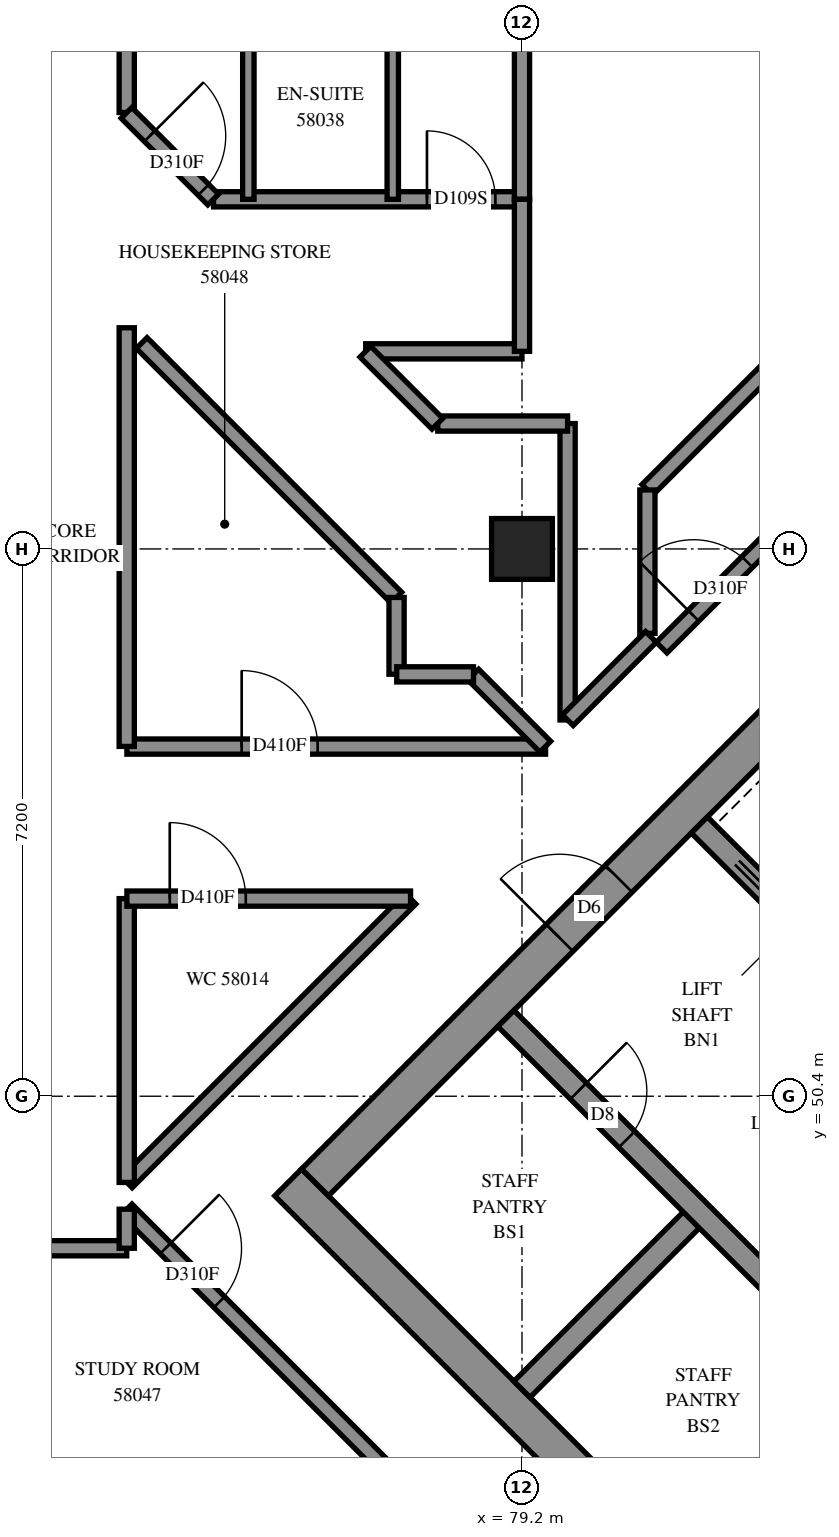
"""IFC4 building model, lengths in metres.
Left out: names, types, materials, properties, quantities, classifications, styles, units other than length and angle.
Written with IfcOpenShell. Run it as: python <this file> out.ifc"""

import sys

from ifc_helpers import new_model, si_unit, direction, frame, frame_2d, origin, origin_2d, place, context, subcontext, project, spatial, rectangle, extrude, element, fill, save


model = new_model("IFC4")
c1 = context("Model", 3, precision=1e-05, world=origin(), true_north=direction((0.0, 1.0)))
c2 = subcontext(c1, "Body", "Model", "MODEL_VIEW")
j1 = project(units=[si_unit("LENGTHUNIT", "METRE"), si_unit("PLANEANGLEUNIT", "RADIAN")], contexts=[c1])
p1 = place(None, origin())
s1 = spatial("IfcSite", under=j1, at=p1, CompositionType="ELEMENT")
p2 = place(p1, origin())
s2 = spatial("IfcBuilding", under=s1, at=p2, CompositionType="ELEMENT")
p3 = place(p2, frame((0.0, 0.0, 213.4)))
s3 = spatial("IfcBuildingStorey", under=s2, at=p3, CompositionType="ELEMENT", Elevation=213.4)
p4 = place(p3, frame((79.2, 57.6, 0.0), z_axis=(0.0, 0.0, 1.0), x_axis=(1.0, 0.0, 0.0)))
e1 = element("IfcColumn", 1, at=p4, inside=s3, PredefinedType="COLUMN", context=c2, shape_type="SweptSolid", body=[
    extrude(rectangle(XDim=0.8, YDim=0.8, at=origin_2d()), origin(), (0.0, 0.0, 1.0), 3.1),
])
p5 = place(p3, frame((76.124, 49.267, -0.3), z_axis=(0.0, 0.0, 1.0), x_axis=(0.7071067812, -0.7071067812, 0.0)))
e2 = element("IfcWall", 2, at=p5, inside=s3, PredefinedType="SHEAR", context=c2, shape_type="SweptSolid", body=[
    extrude(rectangle(XDim=15.4, YDim=0.5, at=frame_2d((7.7, 0.0))), origin(), (0.0, 0.0, 1.0), 2.7),
])
p6 = place(p3, frame((76.478, 49.267, -0.3), z_axis=(0.0, 0.0, 1.0), x_axis=(0.7071067812, 0.7071067812, 0.0)))
e3 = element("IfcWall", 3, at=p6, inside=s3, PredefinedType="SHEAR", context=c2, shape_type="SweptSolid", body=[
    extrude(rectangle(XDim=14.4, YDim=0.5, at=frame_2d((7.2, 0.0))), origin(), (0.0, 0.0, 1.0), 2.7),
])
p7 = place(p6, frame((4.55, 0.0, 0.3)))
e4 = element("IfcOpeningElement", 4, at=p7, cuts=e3, PredefinedType="OPENING", context=c2, shape_type="SweptSolid", body=[
    extrude(rectangle(XDim=1.1, YDim=2.1, at=frame_2d((0.55, 1.05))), frame((0.0, 0.26, 0.0), z_axis=(0.0, -1.0, 0.0), x_axis=(1.0, 0.0, 0.0)), (0.0, 0.0, 1.0), 0.52),
])
p8 = place(p6, frame((11.35, 0.0, 0.3)))
e5 = element("IfcOpeningElement", 5, at=p8, cuts=e3, PredefinedType="OPENING", context=c2, shape_type="SweptSolid", body=[
    extrude(rectangle(XDim=1.1, YDim=2.1, at=frame_2d((0.55, 1.05))), frame((0.0, 0.26, 0.0), z_axis=(0.0, -1.0, 0.0), x_axis=(1.0, 0.0, 0.0)), (0.0, 0.0, 1.0), 0.52),
])
p9 = place(p3, frame((79.2, 46.544, 0.0), z_axis=(0.0, 0.0, 1.0), x_axis=(0.7071219326, 0.7070916295, 0.0)))
e6 = element("IfcWall", 6, at=p9, inside=s3, PredefinedType="SOLIDWALL", context=c2, shape_type="SweptSolid", body=[
    extrude(rectangle(XDim=3.3, YDim=0.3, at=frame_2d((1.65, 0.0))), origin(), (0.0, 0.0, 1.0), 3.1),
])
p10 = place(p3, frame((81.746, 43.999, 0.0), z_axis=(0.0, 0.0, 1.0), x_axis=(0.7071067812, 0.7071067812, 0.0)))
e7 = element("IfcWall", 7, at=p10, inside=s3, PredefinedType="SOLIDWALL", context=c2, shape_type="SweptSolid", body=[
    extrude(rectangle(XDim=3.3, YDim=0.3, at=frame_2d((1.65, 0.0))), origin(), (0.0, 0.0, 1.0), 3.1),
])
p11 = place(p3, frame((78.988, 51.423, 0.0), z_axis=(0.0, 0.0, 1.0), x_axis=(0.7071067812, -0.7071067812, 0.0)))
e8 = element("IfcWall", 8, at=p11, inside=s3, PredefinedType="SOLIDWALL", context=c2, shape_type="SweptSolid", body=[
    extrude(rectangle(XDim=14.4, YDim=0.3, at=frame_2d((7.2, 0.0))), origin(), (0.0, 0.0, 1.0), 3.1),
])
p12 = place(p11, frame((1.35, 0.0, 0.0)))
e9 = element("IfcOpeningElement", 9, at=p12, cuts=e8, PredefinedType="OPENING", context=c2, shape_type="SweptSolid", body=[
    extrude(rectangle(XDim=0.9, YDim=2.1, at=frame_2d((0.45, 1.05))), frame((0.0, 0.16, 0.0), z_axis=(0.0, -1.0, 0.0), x_axis=(1.0, 0.0, 0.0)), (0.0, 0.0, 1.0), 0.32),
])
p13 = place(p11, frame((4.95, 0.0, 0.0)))
e10 = element("IfcOpeningElement", 10, at=p13, cuts=e8, PredefinedType="OPENING", context=c2, shape_type="SweptSolid", body=[
    extrude(rectangle(XDim=0.9, YDim=2.1, at=frame_2d((0.45, 1.05))), frame((0.0, 0.16, 0.0), z_axis=(0.0, -1.0, 0.0), x_axis=(1.0, 0.0, 0.0)), (0.0, 0.0, 1.0), 0.32),
])
p14 = place(p11, frame((8.55, 0.0, 0.0)))
e11 = element("IfcOpeningElement", 11, at=p14, cuts=e8, PredefinedType="OPENING", context=c2, shape_type="SweptSolid", body=[
    extrude(rectangle(XDim=0.9, YDim=2.1, at=frame_2d((0.45, 1.05))), frame((0.0, 0.16, 0.0), z_axis=(0.0, -1.0, 0.0), x_axis=(1.0, 0.0, 0.0)), (0.0, 0.0, 1.0), 0.32),
])
p15 = place(p11, frame((12.05, 0.0, 0.0)))
e12 = element("IfcOpeningElement", 12, at=p15, cuts=e8, PredefinedType="OPENING", context=c2, shape_type="SweptSolid", body=[
    extrude(rectangle(XDim=1.1, YDim=2.1, at=frame_2d((0.55, 1.05))), frame((0.0, 0.16, 0.0), z_axis=(0.0, -1.0, 0.0), x_axis=(1.0, 0.0, 0.0)), (0.0, 0.0, 1.0), 0.32),
])
p16 = place(p3, frame((81.534, 53.969, 0.0), z_axis=(0.0, 0.0, 1.0), x_axis=(0.707103309, -0.7071102534, 0.0)))
e13 = element("IfcWall", 13, at=p16, inside=s3, PredefinedType="SOLIDWALL", context=c2, shape_type="SweptSolid", body=[
    extrude(rectangle(XDim=14.4, YDim=0.3, at=frame_2d((7.2, 0.0))), origin(), (0.0, 0.0, 1.0), 3.1),
])
p17 = place(p16, frame((1.25, 0.0, 0.0)))
e14 = element("IfcOpeningElement", 14, at=p17, cuts=e13, PredefinedType="OPENING", context=c2, shape_type="SweptSolid", body=[
    extrude(rectangle(XDim=1.1, YDim=2.1, at=frame_2d((0.55, 1.05))), frame((0.0, 0.16, 0.0), z_axis=(0.0, -1.0, 0.0), x_axis=(1.0, 0.0, 0.0)), (0.0, 0.0, 1.0), 0.32),
])
p18 = place(p16, frame((4.85, 0.0, 0.0)))
e15 = element("IfcOpeningElement", 15, at=p18, cuts=e13, PredefinedType="OPENING", context=c2, shape_type="SweptSolid", body=[
    extrude(rectangle(XDim=1.1, YDim=2.1, at=frame_2d((0.55, 1.05))), frame((0.0, 0.16, 0.0), z_axis=(0.0, -1.0, 0.0), x_axis=(1.0, 0.0, 0.0)), (0.0, 0.0, 1.0), 0.32),
])
p19 = place(p16, frame((8.45, 0.0, 0.0)))
e16 = element("IfcOpeningElement", 16, at=p19, cuts=e13, PredefinedType="OPENING", context=c2, shape_type="SweptSolid", body=[
    extrude(rectangle(XDim=1.1, YDim=2.1, at=frame_2d((0.55, 1.05))), frame((0.0, 0.16, 0.0), z_axis=(0.0, -1.0, 0.0), x_axis=(1.0, 0.0, 0.0)), (0.0, 0.0, 1.0), 0.32),
])
p20 = place(p16, frame((12.05, 0.0, 0.0)))
e17 = element("IfcOpeningElement", 17, at=p20, cuts=e13, PredefinedType="OPENING", context=c2, shape_type="SweptSolid", body=[
    extrude(rectangle(XDim=1.1, YDim=2.1, at=frame_2d((0.55, 1.05))), frame((0.0, 0.16, 0.0), z_axis=(0.0, -1.0, 0.0), x_axis=(1.0, 0.0, 0.0)), (0.0, 0.0, 1.0), 0.32),
])
p21 = place(p3, frame((55.6, 48.4, 0.0), z_axis=(0.0, 0.0, 1.0), x_axis=(1.0, 0.0, 0.0)))
e18 = element("IfcWall", 18, at=p21, inside=s3, PredefinedType="PARTITIONING", context=c2, shape_type="SweptSolid", body=[
    extrude(rectangle(XDim=18.4, YDim=0.2, at=frame_2d((9.2, 0.0))), origin(), (0.0, 0.0, 1.0), 3.1),
])
p22 = place(p21, frame((5.862, 0.0, 0.0)))
e19 = element("IfcOpeningElement", 19, at=p22, cuts=e18, PredefinedType="OPENING", context=c2, shape_type="SweptSolid", body=[
    extrude(rectangle(XDim=1.0, YDim=2.1, at=frame_2d((0.5, 1.05))), frame((0.0, 0.11, 0.0), z_axis=(0.0, -1.0, 0.0), x_axis=(1.0, 0.0, 0.0)), (0.0, 0.0, 1.0), 0.22),
])
p23 = place(p21, frame((13.099, 0.0, 0.0)))
e20 = element("IfcOpeningElement", 20, at=p23, cuts=e18, PredefinedType="OPENING", context=c2, shape_type="SweptSolid", body=[
    extrude(rectangle(XDim=0.9, YDim=2.1, at=frame_2d((0.45, 1.05))), frame((0.0, 0.11, 0.0), z_axis=(0.0, -1.0, 0.0), x_axis=(1.0, 0.0, 0.0)), (0.0, 0.0, 1.0), 0.22),
])
p24 = place(p3, frame((80.849, 58.377, 0.0), z_axis=(0.0, 0.0, 1.0), x_axis=(0.7071067812, 0.7071067812, 0.0)))
e21 = element("IfcWall", 21, at=p24, inside=s3, PredefinedType="PARTITIONING", context=c2, shape_type="SweptSolid", body=[
    extrude(rectangle(XDim=9.43, YDim=0.2, at=frame_2d((4.715, 0.0))), origin(), (0.0, 0.0, 1.0), 3.1),
])
p25 = place(p3, frame((81.037, 56.303, 0.0), z_axis=(0.0, 0.0, 1.0), x_axis=(0.7071067812, 0.7071067812, 0.0)))
e22 = element("IfcWall", 22, at=p25, inside=s3, PredefinedType="PARTITIONING", context=c2, shape_type="SweptSolid", body=[
    extrude(rectangle(XDim=8.2, YDim=0.2, at=frame_2d((4.1, 0.0))), origin(), (0.0, 0.0, 1.0), 3.1),
])
p26 = place(p25, frame((0.592, 0.0, 0.0)))
e23 = element("IfcOpeningElement", 23, at=p26, cuts=e22, PredefinedType="OPENING", context=c2, shape_type="SweptSolid", body=[
    extrude(rectangle(XDim=1.0, YDim=2.1, at=frame_2d((0.5, 1.05))), frame((0.0, 0.11, 0.0), z_axis=(0.0, -1.0, 0.0), x_axis=(1.0, 0.0, 0.0)), (0.0, 0.0, 1.0), 0.22),
])
p27 = place(p3, frame((73.999, 48.911, 0.0), z_axis=(0.0, 0.0, 1.0), x_axis=(0.7071067812, -0.7071067812, 0.0)))
e24 = element("IfcWall", 24, at=p27, inside=s3, PredefinedType="PARTITIONING", context=c2, shape_type="SweptSolid", body=[
    extrude(rectangle(XDim=5.745, YDim=0.2, at=frame_2d((2.872, 0.0))), origin(), (0.0, 0.0, 1.0), 3.1),
])
p28 = place(p27, frame((0.724, 0.0, 0.0)))
e25 = element("IfcOpeningElement", 25, at=p28, cuts=e24, PredefinedType="OPENING", context=c2, shape_type="SweptSolid", body=[
    extrude(rectangle(XDim=1.0, YDim=2.1, at=frame_2d((0.5, 1.05))), frame((0.0, 0.11, 0.0), z_axis=(0.0, -1.0, 0.0), x_axis=(1.0, 0.0, 0.0)), (0.0, 0.0, 1.0), 0.22),
])
p29 = place(p3, frame((74.002, 55.0, 0.0), z_axis=(0.0, 0.0, 1.0), x_axis=(1.0, 0.0, 0.0)))
e26 = element("IfcWall", 26, at=p29, inside=s3, PredefinedType="PARTITIONING", context=c2, shape_type="SweptSolid", body=[
    extrude(rectangle(XDim=5.508, YDim=0.2, at=frame_2d((2.754, 0.0))), origin(), (0.0, 0.0, 1.0), 3.1),
])
p30 = place(p29, frame((1.51, 0.0, 0.0)))
e27 = element("IfcOpeningElement", 27, at=p30, cuts=e26, PredefinedType="OPENING", context=c2, shape_type="SweptSolid", body=[
    extrude(rectangle(XDim=1.0, YDim=2.1, at=frame_2d((0.5, 1.05))), frame((0.0, 0.11, 0.0), z_axis=(0.0, -1.0, 0.0), x_axis=(1.0, 0.0, 0.0)), (0.0, 0.0, 1.0), 0.22),
])
p31 = place(p3, frame((74.0, 55.002, 0.0), z_axis=(0.0, 0.0, 1.0), x_axis=(0.0, 1.0, 0.0)))
e28 = element("IfcWall", 28, at=p31, inside=s3, PredefinedType="PARTITIONING", context=c2, shape_type="SweptSolid", body=[
    extrude(rectangle(XDim=5.508, YDim=0.2, at=frame_2d((2.754, 0.0))), origin(), (0.0, 0.0, 1.0), 3.1),
])
p32 = place(p3, frame((74.001, 49.267, 0.0), z_axis=(0.0, 0.0, 1.0), x_axis=(0.7071067812, 0.7071067812, 0.0)))
e29 = element("IfcWall", 29, at=p32, inside=s3, PredefinedType="PARTITIONING", context=c2, shape_type="SweptSolid", body=[
    extrude(rectangle(XDim=5.278, YDim=0.2, at=frame_2d((2.639, 0.0))), origin(), (0.0, 0.0, 1.0), 3.1),
])
p33 = place(p3, frame((74.197, 60.309, 0.0), z_axis=(0.0, 0.0, 1.0), x_axis=(0.7071067812, -0.7071067812, 0.0)))
e30 = element("IfcWall", 30, at=p33, inside=s3, PredefinedType="PARTITIONING", context=c2, shape_type="SweptSolid", body=[
    extrude(rectangle(XDim=4.738, YDim=0.2, at=frame_2d((2.369, 0.0))), origin(), (0.0, 0.0, 1.0), 3.1),
])
p34 = place(p3, frame((75.142, 62.2, 0.0), z_axis=(0.0, 0.0, 1.0), x_axis=(1.0, 0.0, 0.0)))
e31 = element("IfcWall", 31, at=p34, inside=s3, PredefinedType="PARTITIONING", context=c2, shape_type="SweptSolid", body=[
    extrude(rectangle(XDim=4.058, YDim=0.2, at=frame_2d((2.029, 0.0))), origin(), (0.0, 0.0, 1.0), 3.1),
])
p35 = place(p34, frame((2.808, 0.0, 0.0)))
e32 = element("IfcOpeningElement", 32, at=p35, cuts=e31, PredefinedType="OPENING", context=c2, shape_type="SweptSolid", body=[
    extrude(rectangle(XDim=0.9, YDim=2.1, at=frame_2d((0.45, 1.05))), frame((0.0, 0.11, 0.0), z_axis=(0.0, -1.0, 0.0), x_axis=(1.0, 0.0, 0.0)), (0.0, 0.0, 1.0), 0.22),
])
p36 = place(p3, frame((79.8, 55.35, 0.0), z_axis=(0.0, 0.0, 1.0), x_axis=(0.0, 1.0, 0.0)))
e33 = element("IfcWall", 33, at=p36, inside=s3, PredefinedType="PARTITIONING", context=c2, shape_type="SweptSolid", body=[
    extrude(rectangle(XDim=3.9, YDim=0.2, at=frame_2d((1.95, 0.0))), origin(), (0.0, 0.0, 1.0), 3.1),
])
p37 = place(p3, frame((74.0, 49.266, 0.0), z_axis=(0.0, 0.0, 1.0), x_axis=(0.0, 1.0, 0.0)))
e34 = element("IfcWall", 34, at=p37, inside=s3, PredefinedType="PARTITIONING", context=c2, shape_type="SweptSolid", body=[
    extrude(rectangle(XDim=3.734, YDim=0.2, at=frame_2d((1.867, 0.0))), origin(), (0.0, 0.0, 1.0), 3.1),
])
p38 = place(p3, frame((74.002, 53.0, 0.0), z_axis=(0.0, 0.0, 1.0), x_axis=(1.0, 0.0, 0.0)))
e35 = element("IfcWall", 35, at=p38, inside=s3, PredefinedType="PARTITIONING", context=c2, shape_type="SweptSolid", body=[
    extrude(rectangle(XDim=3.732, YDim=0.2, at=frame_2d((1.866, 0.0))), origin(), (0.0, 0.0, 1.0), 3.1),
])
p39 = place(p38, frame((0.564, 0.0, 0.0)))
e36 = element("IfcOpeningElement", 36, at=p39, cuts=e35, PredefinedType="OPENING", context=c2, shape_type="SweptSolid", body=[
    extrude(rectangle(XDim=1.0, YDim=2.1, at=frame_2d((0.5, 1.05))), frame((0.0, 0.11, 0.0), z_axis=(0.0, -1.0, 0.0), x_axis=(1.0, 0.0, 0.0)), (0.0, 0.0, 1.0), 0.22),
])
p40 = place(p3, frame((74.0, 63.342, 0.0), z_axis=(0.0, 0.0, 1.0), x_axis=(0.0, 1.0, 0.0)))
e37 = element("IfcWall", 37, at=p40, inside=s3, PredefinedType="PARTITIONING", context=c2, shape_type="SweptSolid", body=[
    extrude(rectangle(XDim=3.458, YDim=0.2, at=frame_2d((1.729, 0.0))), origin(), (0.0, 0.0, 1.0), 3.1),
])
for number, where, z_axis, x_axis in (
    (38, (75.6, 62.2, 0.0), (0.0, 0.0, 1.0), (0.0, 1.0, 0.0)),
    (39, (77.5, 62.2, 0.0), (0.0, 0.0, 1.0), (0.0, 1.0, 0.0)),
):
    element("IfcWall", number, at=place(p3, frame(where, z_axis=z_axis, x_axis=x_axis)), inside=s3, PredefinedType="PARTITIONING", context=c2, shape_type="SweptSolid", body=[
        extrude(rectangle(XDim=2.4, YDim=0.15, at=frame_2d((1.2, 0.0))), origin(), (0.0, 0.0, 1.0), 3.1),
    ])
p41 = place(p3, frame((79.2, 62.2, 0.0), z_axis=(0.0, 0.0, 1.0), x_axis=(0.0, 1.0, 0.0)))
e40 = element("IfcWall", 40, at=p41, inside=s3, PredefinedType="PARTITIONING", context=c2, shape_type="SweptSolid", body=[
    extrude(rectangle(XDim=2.2, YDim=0.2, at=frame_2d((1.1, 0.0))), origin(), (0.0, 0.0, 1.0), 3.1),
])
p42 = place(p3, frame((77.144, 60.2, 0.0), z_axis=(0.0, 0.0, 1.0), x_axis=(1.0, 0.0, 0.0)))
e41 = element("IfcWall", 41, at=p42, inside=s3, PredefinedType="PARTITIONING", context=c2, shape_type="SweptSolid", body=[
    extrude(rectangle(XDim=2.056, YDim=0.2, at=frame_2d((1.028, 0.0))), origin(), (0.0, 0.0, 1.0), 3.1),
])
p43 = place(p3, frame((79.2, 60.2, 0.0), z_axis=(0.0, 0.0, 1.0), x_axis=(0.0, 1.0, 0.0)))
e42 = element("IfcWall", 42, at=p43, inside=s3, PredefinedType="PARTITIONING", context=c2, shape_type="SweptSolid", body=[
    extrude(rectangle(XDim=2.0, YDim=0.2, at=frame_2d((1.0, 0.0))), origin(), (0.0, 0.0, 1.0), 3.1),
])
p44 = place(p3, frame((80.85, 56.49, 0.0), z_axis=(0.0, 0.0, 1.0), x_axis=(0.0, 1.0, 0.0)))
e43 = element("IfcWall", 43, at=p44, inside=s3, PredefinedType="PARTITIONING", context=c2, shape_type="SweptSolid", body=[
    extrude(rectangle(XDim=1.886, YDim=0.2, at=frame_2d((0.943, 0.0))), origin(), (0.0, 0.0, 1.0), 3.1),
])
p45 = place(p3, frame((78.092, 59.25, 0.0), z_axis=(0.0, 0.0, 1.0), x_axis=(1.0, 0.0, 0.0)))
e44 = element("IfcWall", 44, at=p45, inside=s3, PredefinedType="PARTITIONING", context=c2, shape_type="SweptSolid", body=[
    extrude(rectangle(XDim=1.708, YDim=0.2, at=frame_2d((0.854, 0.0))), origin(), (0.0, 0.0, 1.0), 3.1),
])
p46 = place(p3, frame((73.997, 63.337, 0.0), z_axis=(0.0, 0.0, 1.0), x_axis=(0.7071067812, -0.7071067812, 0.0)))
e45 = element("IfcWall", 45, at=p46, inside=s3, PredefinedType="PARTITIONING", context=c2, shape_type="SweptSolid", body=[
    extrude(rectangle(XDim=1.612, YDim=0.2, at=frame_2d((0.806, 0.0))), origin(), (0.0, 0.0, 1.0), 3.1),
])
p47 = place(p46, frame((0.432, 0.0, 0.0)))
e46 = element("IfcOpeningElement", 46, at=p47, cuts=e45, PredefinedType="OPENING", context=c2, shape_type="SweptSolid", body=[
    extrude(rectangle(XDim=1.0, YDim=2.1, at=frame_2d((0.5, 1.05))), frame((0.0, 0.11, 0.0), z_axis=(0.0, -1.0, 0.0), x_axis=(1.0, 0.0, 0.0)), (0.0, 0.0, 1.0), 0.22),
])
p48 = place(p3, frame((79.803, 55.347, 0.0), z_axis=(0.0, 0.0, 1.0), x_axis=(0.706460727, 0.7077522457, 0.0)))
e47 = element("IfcWall", 47, at=p48, inside=s3, PredefinedType="PARTITIONING", context=c2, shape_type="SweptSolid", body=[
    extrude(rectangle(XDim=1.549, YDim=0.2, at=frame_2d((0.774, 0.0))), origin(), (0.0, 0.0, 1.0), 3.1),
])
for number, where, z_axis, x_axis in (
    (48, (78.559, 55.947, 0.0), (0.0, 0.0, 1.0), (0.707, -0.707, 0.0)),
    (49, (77.139, 60.195, 0.0), (0.0, 0.0, 1.0), (0.707, -0.707, 0.0)),
):
    element("IfcWall", number, at=place(p3, frame(where, z_axis=z_axis, x_axis=x_axis)), inside=s3, PredefinedType="PARTITIONING", context=c2, shape_type="SweptSolid", body=[
        extrude(rectangle(XDim=1.341, YDim=0.2, at=frame_2d((0.67, 0.0))), origin(), (0.0, 0.0, 1.0), 3.1),
    ])
for number, where, z_axis, x_axis in (
    (50, (77.55, 55.952, 0.0), (0.0, 0.0, 1.0), (0.0, 1.0, 0.0)),
    (51, (77.552, 55.95, 0.0), (0.0, 0.0, 1.0), (1.0, 0.0, 0.0)),
):
    element("IfcWall", number, at=place(p3, frame(where, z_axis=z_axis, x_axis=x_axis)), inside=s3, PredefinedType="PARTITIONING", context=c2, shape_type="SweptSolid", body=[
        extrude(rectangle(XDim=1.01, YDim=0.2, at=frame_2d((0.505, 0.0))), origin(), (0.0, 0.0, 1.0), 3.1),
    ])
p49 = place(p3, frame((74.0, 48.4, 0.0), z_axis=(0.0, 0.0, 1.0), x_axis=(0.0, 1.0, 0.0)))
e52 = element("IfcWall", 52, at=p49, inside=s3, PredefinedType="PARTITIONING", context=c2, shape_type="SweptSolid", body=[
    extrude(rectangle(XDim=0.514, YDim=0.2, at=frame_2d((0.257, 0.0))), origin(), (0.0, 0.0, 1.0), 3.1),
])
p50 = place(p7, origin())
e53 = element("IfcDoor", 53, at=p50, inside=s3, OperationType="DOUBLE_DOOR_SINGLE_SWING", PredefinedType="DOOR", context=c2, shape_type="SweptSolid", body=[
    extrude(rectangle(XDim=1.1, YDim=2.1, at=frame_2d((0.55, 1.05))), frame((0.0, 0.025, 0.0), z_axis=(0.0, -1.0, 0.0), x_axis=(1.0, 0.0, 0.0)), (0.0, 0.0, 1.0), 0.05),
])
fill(e4, e53)
p51 = place(p12, origin())
e54 = element("IfcDoor", 54, at=p51, inside=s3, OperationType="SINGLE_SWING_LEFT", PredefinedType="DOOR", context=c2, shape_type="SweptSolid", body=[
    extrude(rectangle(XDim=0.9, YDim=2.1, at=frame_2d((0.45, 1.05))), frame((0.0, 0.025, 0.0), z_axis=(0.0, -1.0, 0.0), x_axis=(1.0, 0.0, 0.0)), (0.0, 0.0, 1.0), 0.05),
])
fill(e9, e54)
p52 = place(p39, origin())
e55 = element("IfcDoor", 55, at=p52, inside=s3, OperationType="SINGLE_SWING_RIGHT", PredefinedType="DOOR", context=c2, shape_type="SweptSolid", body=[
    extrude(rectangle(XDim=1.0, YDim=2.1, at=frame_2d((0.5, 1.05))), frame((0.0, 0.025, 0.0), z_axis=(0.0, -1.0, 0.0), x_axis=(1.0, 0.0, 0.0)), (0.0, 0.0, 1.0), 0.05),
])
fill(e36, e55)
p53 = place(p47, origin())
e56 = element("IfcDoor", 56, at=p53, inside=s3, OperationType="SINGLE_SWING_RIGHT", PredefinedType="DOOR", context=c2, shape_type="SweptSolid", body=[
    extrude(rectangle(XDim=1.0, YDim=2.1, at=frame_2d((0.5, 1.05))), frame((0.0, 0.025, 0.0), z_axis=(0.0, -1.0, 0.0), x_axis=(1.0, 0.0, 0.0)), (0.0, 0.0, 1.0), 0.05),
])
fill(e46, e56)
p54 = place(p35, origin())
e57 = element("IfcDoor", 57, at=p54, inside=s3, OperationType="SINGLE_SWING_LEFT", PredefinedType="DOOR", context=c2, shape_type="SweptSolid", body=[
    extrude(rectangle(XDim=0.9, YDim=2.1, at=frame_2d((0.45, 1.05))), frame((0.0, 0.025, 0.0), z_axis=(0.0, -1.0, 0.0), x_axis=(1.0, 0.0, 0.0)), (0.0, 0.0, 1.0), 0.05),
])
fill(e32, e57)
p55 = place(p28, origin())
e58 = element("IfcDoor", 58, at=p55, inside=s3, OperationType="SINGLE_SWING_LEFT", PredefinedType="DOOR", context=c2, shape_type="SweptSolid", body=[
    extrude(rectangle(XDim=1.0, YDim=2.1, at=frame_2d((0.5, 1.05))), frame((0.0, 0.025, 0.0), z_axis=(0.0, -1.0, 0.0), x_axis=(1.0, 0.0, 0.0)), (0.0, 0.0, 1.0), 0.05),
])
fill(e25, e58)
p56 = place(p30, origin())
e59 = element("IfcDoor", 59, at=p56, inside=s3, OperationType="SINGLE_SWING_LEFT", PredefinedType="DOOR", context=c2, shape_type="SweptSolid", body=[
    extrude(rectangle(XDim=1.0, YDim=2.1, at=frame_2d((0.5, 1.05))), frame((0.0, 0.025, 0.0), z_axis=(0.0, -1.0, 0.0), x_axis=(1.0, 0.0, 0.0)), (0.0, 0.0, 1.0), 0.05),
])
fill(e27, e59)
p57 = place(p26, origin())
e60 = element("IfcDoor", 60, at=p57, inside=s3, OperationType="SINGLE_SWING_RIGHT", PredefinedType="DOOR", context=c2, shape_type="SweptSolid", body=[
    extrude(rectangle(XDim=1.0, YDim=2.1, at=frame_2d((0.5, 1.05))), frame((0.0, 0.025, 0.0), z_axis=(0.0, -1.0, 0.0), x_axis=(1.0, 0.0, 0.0)), (0.0, 0.0, 1.0), 0.05),
])
fill(e23, e60)
save(model, sys.argv[1])
